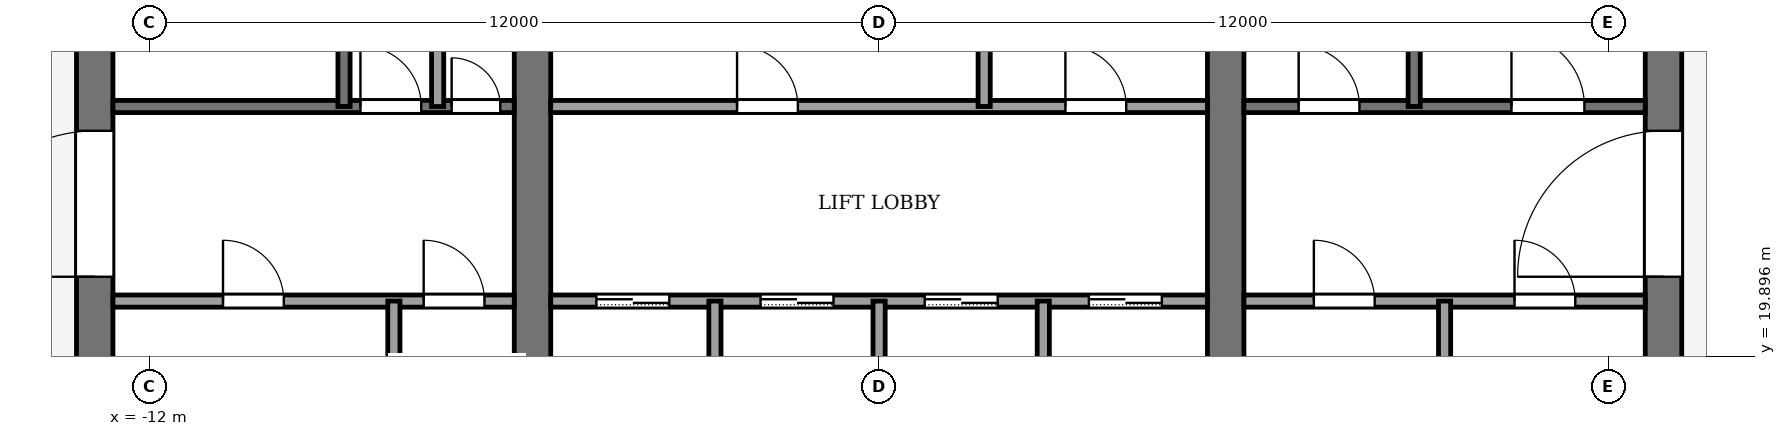
"""IFC4 building model, lengths in metres.
Left out: names, types, materials, properties, quantities, classifications, styles, units other than length and angle.
Written with IfcOpenShell. Run it as: python <this file> out.ifc"""

import sys

from ifc_helpers import new_model, si_unit, direction, frame, frame_2d, origin, place, context, subcontext, project, spatial, rectangle, extrude, element, fill, save


model = new_model("IFC4")
c1 = context("Model", 3, precision=1e-05, world=origin(), true_north=direction((0.0, 1.0)))
c2 = subcontext(c1, "Body", "Model", "MODEL_VIEW")
j1 = project(units=[si_unit("LENGTHUNIT", "METRE"), si_unit("PLANEANGLEUNIT", "RADIAN")], contexts=[c1])
p1 = place(None, origin())
s1 = spatial("IfcSite", under=j1, at=p1, CompositionType="ELEMENT")
p2 = place(p1, origin())
s2 = spatial("IfcBuilding", under=s1, at=p2, CompositionType="ELEMENT")
p3 = place(p2, frame((0.0, 0.0, 334.0)))
s3 = spatial("IfcBuildingStorey", under=s2, at=p3, CompositionType="ELEMENT", Elevation=334.0)
p4 = place(p3, frame((-12.9, 18.4, -0.18), z_axis=(0.0, 0.0, 1.0), x_axis=(0.0, 1.0, 0.0)))
e1 = element("IfcWall", 1, at=p4, inside=s3, PredefinedType="SHEAR", context=c2, shape_type="SweptSolid", body=[
    extrude(rectangle(XDim=19.2, YDim=0.6, at=frame_2d((9.6, 0.0))), origin(), (0.0, 0.0, 1.0), 6.53),
])
p5 = place(p4, frame((2.8, 0.0, 0.18)))
e2 = element("IfcOpeningElement", 2, at=p5, cuts=e1, PredefinedType="OPENING", context=c2, shape_type="SweptSolid", body=[
    extrude(rectangle(XDim=2.4, YDim=2.4, at=frame_2d((1.2, 1.2))), frame((0.0, 0.31, 0.0), z_axis=(0.0, -1.0, 0.0), x_axis=(1.0, 0.0, 0.0)), (0.0, 0.0, 1.0), 0.62),
])
p6 = place(p4, frame((13.4, 0.0, 0.18)))
e3 = element("IfcOpeningElement", 3, at=p6, cuts=e1, PredefinedType="OPENING", context=c2, shape_type="SweptSolid", body=[
    extrude(rectangle(XDim=1.4, YDim=2.2, at=frame_2d((0.7, 1.1))), frame((0.0, 0.31, 0.0), z_axis=(0.0, -1.0, 0.0), x_axis=(1.0, 0.0, 0.0)), (0.0, 0.0, 1.0), 0.62),
])
p7 = place(p3, frame((12.9, 18.4, -0.18), z_axis=(0.0, 0.0, 1.0), x_axis=(0.0, 1.0, 0.0)))
e4 = element("IfcWall", 4, at=p7, inside=s3, PredefinedType="SHEAR", context=c2, shape_type="SweptSolid", body=[
    extrude(rectangle(XDim=19.2, YDim=0.6, at=frame_2d((9.6, 0.0))), origin(), (0.0, 0.0, 1.0), 6.53),
])
p8 = place(p7, frame((2.8, 0.0, 0.18)))
e5 = element("IfcOpeningElement", 5, at=p8, cuts=e4, PredefinedType="OPENING", context=c2, shape_type="SweptSolid", body=[
    extrude(rectangle(XDim=2.4, YDim=2.4, at=frame_2d((1.2, 1.2))), frame((0.0, 0.31, 0.0), z_axis=(0.0, -1.0, 0.0), x_axis=(1.0, 0.0, 0.0)), (0.0, 0.0, 1.0), 0.62),
])
p9 = place(p7, frame((13.3, 0.0, 0.18)))
e6 = element("IfcOpeningElement", 6, at=p9, cuts=e4, PredefinedType="OPENING", context=c2, shape_type="SweptSolid", body=[
    extrude(rectangle(XDim=2.4, YDim=2.4, at=frame_2d((1.2, 1.2))), frame((0.0, 0.31, 0.0), z_axis=(0.0, -1.0, 0.0), x_axis=(1.0, 0.0, 0.0)), (0.0, 0.0, 1.0), 0.62),
])
p10 = place(p3, frame((-5.7, 18.4, -0.18), z_axis=(0.0, 0.0, 1.0), x_axis=(0.0, 1.0, 0.0)))
e7 = element("IfcWall", 7, at=p10, inside=s3, PredefinedType="SHEAR", context=c2, shape_type="SweptSolid", body=[
    extrude(rectangle(XDim=19.2, YDim=0.6, at=frame_2d((9.6, 0.0))), origin(), (0.0, 0.0, 1.0), 6.53),
])
p11 = place(p10, frame((8.35, 0.0, 0.18)))
e8 = element("IfcOpeningElement", 8, at=p11, cuts=e7, PredefinedType="OPENING", context=c2, shape_type="SweptSolid", body=[
    extrude(rectangle(XDim=0.9, YDim=2.1, at=frame_2d((0.45, 1.05))), frame((0.0, 0.31, 0.0), z_axis=(0.0, -1.0, 0.0), x_axis=(1.0, 0.0, 0.0)), (0.0, 0.0, 1.0), 0.62),
])
p12 = place(p3, frame((5.7, 18.4, -0.18), z_axis=(0.0, 0.0, 1.0), x_axis=(0.0, 1.0, 0.0)))
e9 = element("IfcWall", 9, at=p12, inside=s3, PredefinedType="SHEAR", context=c2, shape_type="SweptSolid", body=[
    extrude(rectangle(XDim=19.2, YDim=0.6, at=frame_2d((9.6, 0.0))), origin(), (0.0, 0.0, 1.0), 6.53),
])
p13 = place(p12, frame((8.35, 0.0, 0.18)))
e10 = element("IfcOpeningElement", 10, at=p13, cuts=e9, PredefinedType="OPENING", context=c2, shape_type="SweptSolid", body=[
    extrude(rectangle(XDim=0.9, YDim=2.1, at=frame_2d((0.45, 1.05))), frame((0.0, 0.31, 0.0), z_axis=(0.0, -1.0, 0.0), x_axis=(1.0, 0.0, 0.0)), (0.0, 0.0, 1.0), 0.62),
])
p14 = place(p12, frame((13.3, 0.0, 0.18)))
e11 = element("IfcOpeningElement", 11, at=p14, cuts=e9, PredefinedType="OPENING", context=c2, shape_type="SweptSolid", body=[
    extrude(rectangle(XDim=2.4, YDim=2.4, at=frame_2d((1.2, 1.2))), frame((0.0, 0.31, 0.0), z_axis=(0.0, -1.0, 0.0), x_axis=(1.0, 0.0, 0.0)), (0.0, 0.0, 1.0), 0.62),
])
p15 = place(p3, frame((-12.6, 20.8, 0.0), z_axis=(0.0, 0.0, 1.0), x_axis=(1.0, 0.0, 0.0)))
e12 = element("IfcWall", 12, at=p15, inside=s3, PredefinedType="PARTITIONING", context=c2, shape_type="SweptSolid", body=[
    extrude(rectangle(XDim=6.6, YDim=0.2, at=frame_2d((3.3, 0.0))), origin(), (0.0, 0.0, 1.0), 6.35),
])
p16 = place(p15, frame((1.81, 0.0, 0.0)))
e13 = element("IfcOpeningElement", 13, at=p16, cuts=e12, PredefinedType="OPENING", context=c2, shape_type="SweptSolid", body=[
    extrude(rectangle(XDim=1.0, YDim=2.1, at=frame_2d((0.5, 1.05))), frame((0.0, 0.11, 0.0), z_axis=(0.0, -1.0, 0.0), x_axis=(1.0, 0.0, 0.0)), (0.0, 0.0, 1.0), 0.22),
])
p17 = place(p15, frame((5.11, 0.0, 0.0)))
e14 = element("IfcOpeningElement", 14, at=p17, cuts=e12, PredefinedType="OPENING", context=c2, shape_type="SweptSolid", body=[
    extrude(rectangle(XDim=1.0, YDim=2.1, at=frame_2d((0.5, 1.05))), frame((0.0, 0.11, 0.0), z_axis=(0.0, -1.0, 0.0), x_axis=(1.0, 0.0, 0.0)), (0.0, 0.0, 1.0), 0.22),
])
p18 = place(p3, frame((-5.4, 20.8, 0.0), z_axis=(0.0, 0.0, 1.0), x_axis=(1.0, 0.0, 0.0)))
e15 = element("IfcWall", 15, at=p18, inside=s3, PredefinedType="PARTITIONING", context=c2, shape_type="SweptSolid", body=[
    extrude(rectangle(XDim=10.8, YDim=0.2, at=frame_2d((5.4, 0.0))), origin(), (0.0, 0.0, 1.0), 6.35),
])
p19 = place(p18, frame((0.75, 0.0, 0.0)))
e16 = element("IfcOpeningElement", 16, at=p19, cuts=e15, PredefinedType="OPENING", context=c2, shape_type="SweptSolid", body=[
    extrude(rectangle(XDim=1.2, YDim=2.2, at=frame_2d((0.6, 1.1))), frame((0.0, 0.11, 0.0), z_axis=(0.0, -1.0, 0.0), x_axis=(1.0, 0.0, 0.0)), (0.0, 0.0, 1.0), 0.22),
])
p20 = place(p18, frame((3.45, 0.0, 0.0)))
e17 = element("IfcOpeningElement", 17, at=p20, cuts=e15, PredefinedType="OPENING", context=c2, shape_type="SweptSolid", body=[
    extrude(rectangle(XDim=1.2, YDim=2.2, at=frame_2d((0.6, 1.1))), frame((0.0, 0.11, 0.0), z_axis=(0.0, -1.0, 0.0), x_axis=(1.0, 0.0, 0.0)), (0.0, 0.0, 1.0), 0.22),
])
p21 = place(p18, frame((6.15, 0.0, 0.0)))
e18 = element("IfcOpeningElement", 18, at=p21, cuts=e15, PredefinedType="OPENING", context=c2, shape_type="SweptSolid", body=[
    extrude(rectangle(XDim=1.2, YDim=2.2, at=frame_2d((0.6, 1.1))), frame((0.0, 0.11, 0.0), z_axis=(0.0, -1.0, 0.0), x_axis=(1.0, 0.0, 0.0)), (0.0, 0.0, 1.0), 0.22),
])
p22 = place(p18, frame((8.85, 0.0, 0.0)))
e19 = element("IfcOpeningElement", 19, at=p22, cuts=e15, PredefinedType="OPENING", context=c2, shape_type="SweptSolid", body=[
    extrude(rectangle(XDim=1.2, YDim=2.2, at=frame_2d((0.6, 1.1))), frame((0.0, 0.11, 0.0), z_axis=(0.0, -1.0, 0.0), x_axis=(1.0, 0.0, 0.0)), (0.0, 0.0, 1.0), 0.22),
])
p23 = place(p3, frame((6.0, 20.8, 0.0), z_axis=(0.0, 0.0, 1.0), x_axis=(1.0, 0.0, 0.0)))
e20 = element("IfcWall", 20, at=p23, inside=s3, PredefinedType="PARTITIONING", context=c2, shape_type="SweptSolid", body=[
    extrude(rectangle(XDim=6.6, YDim=0.2, at=frame_2d((3.3, 0.0))), origin(), (0.0, 0.0, 1.0), 6.35),
])
p24 = place(p23, frame((1.15, 0.0, 0.0)))
e21 = element("IfcOpeningElement", 21, at=p24, cuts=e20, PredefinedType="OPENING", context=c2, shape_type="SweptSolid", body=[
    extrude(rectangle(XDim=1.0, YDim=2.1, at=frame_2d((0.5, 1.05))), frame((0.0, 0.11, 0.0), z_axis=(0.0, -1.0, 0.0), x_axis=(1.0, 0.0, 0.0)), (0.0, 0.0, 1.0), 0.22),
])
p25 = place(p23, frame((4.45, 0.0, 0.0)))
e22 = element("IfcOpeningElement", 22, at=p25, cuts=e20, PredefinedType="OPENING", context=c2, shape_type="SweptSolid", body=[
    extrude(rectangle(XDim=1.0, YDim=2.1, at=frame_2d((0.5, 1.05))), frame((0.0, 0.11, 0.0), z_axis=(0.0, -1.0, 0.0), x_axis=(1.0, 0.0, 0.0)), (0.0, 0.0, 1.0), 0.22),
])
p26 = place(p3, frame((-12.6, 24.0, 0.0), z_axis=(0.0, 0.0, 1.0), x_axis=(1.0, 0.0, 0.0)))
e23 = element("IfcWall", 23, at=p26, inside=s3, PredefinedType="PARTITIONING", context=c2, shape_type="SweptSolid", body=[
    extrude(rectangle(XDim=6.6, YDim=0.2, at=frame_2d((3.3, 0.0))), origin(), (0.0, 0.0, 1.0), 6.35),
])
p27 = place(p26, frame((4.07, 0.0, 0.0)))
e24 = element("IfcOpeningElement", 24, at=p27, cuts=e23, PredefinedType="OPENING", context=c2, shape_type="SweptSolid", body=[
    extrude(rectangle(XDim=1.0, YDim=2.1, at=frame_2d((0.5, 1.05))), frame((0.0, 0.11, 0.0), z_axis=(0.0, -1.0, 0.0), x_axis=(1.0, 0.0, 0.0)), (0.0, 0.0, 1.0), 0.22),
])
p28 = place(p26, frame((5.57, 0.0, 0.0)))
e25 = element("IfcOpeningElement", 25, at=p28, cuts=e23, PredefinedType="OPENING", context=c2, shape_type="SweptSolid", body=[
    extrude(rectangle(XDim=0.8, YDim=2.1, at=frame_2d((0.4, 1.05))), frame((0.0, 0.11, 0.0), z_axis=(0.0, -1.0, 0.0), x_axis=(1.0, 0.0, 0.0)), (0.0, 0.0, 1.0), 0.22),
])
p29 = place(p3, frame((-5.4, 24.0, 0.0), z_axis=(0.0, 0.0, 1.0), x_axis=(1.0, 0.0, 0.0)))
e26 = element("IfcWall", 26, at=p29, inside=s3, PredefinedType="PARTITIONING", context=c2, shape_type="SweptSolid", body=[
    extrude(rectangle(XDim=10.8, YDim=0.2, at=frame_2d((5.4, 0.0))), origin(), (0.0, 0.0, 1.0), 6.35),
])
p30 = place(p29, frame((3.064, 0.0, 0.0)))
e27 = element("IfcOpeningElement", 27, at=p30, cuts=e26, PredefinedType="OPENING", context=c2, shape_type="SweptSolid", body=[
    extrude(rectangle(XDim=1.0, YDim=2.1, at=frame_2d((0.5, 1.05))), frame((0.0, 0.11, 0.0), z_axis=(0.0, -1.0, 0.0), x_axis=(1.0, 0.0, 0.0)), (0.0, 0.0, 1.0), 0.22),
])
p31 = place(p29, frame((8.464, 0.0, 0.0)))
e28 = element("IfcOpeningElement", 28, at=p31, cuts=e26, PredefinedType="OPENING", context=c2, shape_type="SweptSolid", body=[
    extrude(rectangle(XDim=1.0, YDim=2.1, at=frame_2d((0.5, 1.05))), frame((0.0, 0.11, 0.0), z_axis=(0.0, -1.0, 0.0), x_axis=(1.0, 0.0, 0.0)), (0.0, 0.0, 1.0), 0.22),
])
p32 = place(p3, frame((6.0, 24.0, 0.0), z_axis=(0.0, 0.0, 1.0), x_axis=(1.0, 0.0, 0.0)))
e29 = element("IfcWall", 29, at=p32, inside=s3, PredefinedType="PARTITIONING", context=c2, shape_type="SweptSolid", body=[
    extrude(rectangle(XDim=6.6, YDim=0.2, at=frame_2d((3.3, 0.0))), origin(), (0.0, 0.0, 1.0), 6.35),
])
p33 = place(p32, frame((0.9, 0.0, 0.0)))
e30 = element("IfcOpeningElement", 30, at=p33, cuts=e29, PredefinedType="OPENING", context=c2, shape_type="SweptSolid", body=[
    extrude(rectangle(XDim=1.0, YDim=2.1, at=frame_2d((0.5, 1.05))), frame((0.0, 0.11, 0.0), z_axis=(0.0, -1.0, 0.0), x_axis=(1.0, 0.0, 0.0)), (0.0, 0.0, 1.0), 0.22),
])
p34 = place(p32, frame((4.4, 0.0, 0.0)))
e31 = element("IfcOpeningElement", 31, at=p34, cuts=e29, PredefinedType="OPENING", context=c2, shape_type="SweptSolid", body=[
    extrude(rectangle(XDim=1.2, YDim=2.2, at=frame_2d((0.6, 1.1))), frame((0.0, 0.11, 0.0), z_axis=(0.0, -1.0, 0.0), x_axis=(1.0, 0.0, 0.0)), (0.0, 0.0, 1.0), 0.22),
])
p35 = place(p3, frame((-8.8, 24.0, 0.0), z_axis=(0.0, 0.0, 1.0), x_axis=(0.0, 1.0, 0.0)))
e32 = element("IfcWall", 32, at=p35, inside=s3, PredefinedType="PARTITIONING", context=c2, shape_type="SweptSolid", body=[
    extrude(rectangle(XDim=7.4, YDim=0.2, at=frame_2d((3.7, 0.0))), origin(), (0.0, 0.0, 1.0), 6.35),
])
p36 = place(p3, frame((-7.98, 18.4, 0.0), z_axis=(0.0, 0.0, 1.0), x_axis=(0.0, 1.0, 0.0)))
e33 = element("IfcWall", 33, at=p36, inside=s3, PredefinedType="PARTITIONING", context=c2, shape_type="SweptSolid", body=[
    extrude(rectangle(XDim=2.4, YDim=0.2, at=frame_2d((1.2, 0.0))), origin(), (0.0, 0.0, 1.0), 6.35),
])
p37 = place(p3, frame((-7.26, 24.0, 0.0), z_axis=(0.0, 0.0, 1.0), x_axis=(0.0, 1.0, 0.0)))
e34 = element("IfcWall", 34, at=p37, inside=s3, PredefinedType="PARTITIONING", context=c2, shape_type="SweptSolid", body=[
    extrude(rectangle(XDim=7.4, YDim=0.2, at=frame_2d((3.7, 0.0))), origin(), (0.0, 0.0, 1.0), 6.35),
])
for number, where, z_axis, x_axis in (
    (35, (-2.7, 18.4, 0.0), (0.0, 0.0, 1.0), (0.0, 1.0, 0.0)),
    (36, (0.0, 18.4, 0.0), (0.0, 0.0, 1.0), (0.0, 1.0, 0.0)),
):
    element("IfcWall", number, at=place(p3, frame(where, z_axis=z_axis, x_axis=x_axis)), inside=s3, PredefinedType="PARTITIONING", context=c2, shape_type="SweptSolid", body=[
        extrude(rectangle(XDim=2.4, YDim=0.2, at=frame_2d((1.2, 0.0))), origin(), (0.0, 0.0, 1.0), 6.35),
    ])
p38 = place(p3, frame((1.728, 24.0, 0.0), z_axis=(0.0, 0.0, 1.0), x_axis=(0.0, 1.0, 0.0)))
e37 = element("IfcWall", 37, at=p38, inside=s3, PredefinedType="PARTITIONING", context=c2, shape_type="SweptSolid", body=[
    extrude(rectangle(XDim=2.4, YDim=0.2, at=frame_2d((1.2, 0.0))), origin(), (0.0, 0.0, 1.0), 6.35),
])
p39 = place(p3, frame((2.7, 18.4, 0.0), z_axis=(0.0, 0.0, 1.0), x_axis=(0.0, 1.0, 0.0)))
e38 = element("IfcWall", 38, at=p39, inside=s3, PredefinedType="PARTITIONING", context=c2, shape_type="SweptSolid", body=[
    extrude(rectangle(XDim=2.4, YDim=0.2, at=frame_2d((1.2, 0.0))), origin(), (0.0, 0.0, 1.0), 6.35),
])
p40 = place(p3, frame((8.8, 24.0, 0.0), z_axis=(0.0, 0.0, 1.0), x_axis=(0.0, 1.0, 0.0)))
e39 = element("IfcWall", 39, at=p40, inside=s3, PredefinedType="PARTITIONING", context=c2, shape_type="SweptSolid", body=[
    extrude(rectangle(XDim=7.4, YDim=0.2, at=frame_2d((3.7, 0.0))), origin(), (0.0, 0.0, 1.0), 6.35),
])
p41 = place(p3, frame((9.3, 18.4, 0.0), z_axis=(0.0, 0.0, 1.0), x_axis=(0.0, 1.0, 0.0)))
e40 = element("IfcWall", 40, at=p41, inside=s3, PredefinedType="PARTITIONING", context=c2, shape_type="SweptSolid", body=[
    extrude(rectangle(XDim=2.4, YDim=0.2, at=frame_2d((1.2, 0.0))), origin(), (0.0, 0.0, 1.0), 6.35),
])
p42 = place(p19, origin())
e41 = element("IfcDoor", 41, at=p42, inside=s3, OperationType="SLIDING_TO_LEFT", PredefinedType="DOOR", context=c2, shape_type="SweptSolid", body=[
    extrude(rectangle(XDim=1.2, YDim=2.2, at=frame_2d((0.6, 1.1))), frame((0.0, 0.025, 0.0), z_axis=(0.0, -1.0, 0.0), x_axis=(1.0, 0.0, 0.0)), (0.0, 0.0, 1.0), 0.05),
])
fill(e16, e41)
p43 = place(p20, origin())
e42 = element("IfcDoor", 42, at=p43, inside=s3, OperationType="SLIDING_TO_LEFT", PredefinedType="DOOR", context=c2, shape_type="SweptSolid", body=[
    extrude(rectangle(XDim=1.2, YDim=2.2, at=frame_2d((0.6, 1.1))), frame((0.0, 0.025, 0.0), z_axis=(0.0, -1.0, 0.0), x_axis=(1.0, 0.0, 0.0)), (0.0, 0.0, 1.0), 0.05),
])
fill(e17, e42)
p44 = place(p21, origin())
e43 = element("IfcDoor", 43, at=p44, inside=s3, OperationType="SLIDING_TO_LEFT", PredefinedType="DOOR", context=c2, shape_type="SweptSolid", body=[
    extrude(rectangle(XDim=1.2, YDim=2.2, at=frame_2d((0.6, 1.1))), frame((0.0, 0.025, 0.0), z_axis=(0.0, -1.0, 0.0), x_axis=(1.0, 0.0, 0.0)), (0.0, 0.0, 1.0), 0.05),
])
fill(e18, e43)
p45 = place(p22, origin())
e44 = element("IfcDoor", 44, at=p45, inside=s3, OperationType="SLIDING_TO_LEFT", PredefinedType="DOOR", context=c2, shape_type="SweptSolid", body=[
    extrude(rectangle(XDim=1.2, YDim=2.2, at=frame_2d((0.6, 1.1))), frame((0.0, 0.025, 0.0), z_axis=(0.0, -1.0, 0.0), x_axis=(1.0, 0.0, 0.0)), (0.0, 0.0, 1.0), 0.05),
])
fill(e19, e44)
p46 = place(p30, origin())
e45 = element("IfcDoor", 45, at=p46, inside=s3, OperationType="SINGLE_SWING_RIGHT", PredefinedType="DOOR", context=c2, shape_type="SweptSolid", body=[
    extrude(rectangle(XDim=1.0, YDim=2.1, at=frame_2d((0.5, 1.05))), frame((0.0, 0.025, 0.0), z_axis=(0.0, -1.0, 0.0), x_axis=(1.0, 0.0, 0.0)), (0.0, 0.0, 1.0), 0.05),
])
fill(e27, e45)
p47 = place(p31, origin())
e46 = element("IfcDoor", 46, at=p47, inside=s3, OperationType="SINGLE_SWING_LEFT", PredefinedType="DOOR", context=c2, shape_type="SweptSolid", body=[
    extrude(rectangle(XDim=1.0, YDim=2.1, at=frame_2d((0.5, 1.05))), frame((0.0, 0.025, 0.0), z_axis=(0.0, -1.0, 0.0), x_axis=(1.0, 0.0, 0.0)), (0.0, 0.0, 1.0), 0.05),
])
fill(e28, e46)
p48 = place(p16, origin())
e47 = element("IfcDoor", 47, at=p48, inside=s3, OperationType="SINGLE_SWING_LEFT", PredefinedType="DOOR", context=c2, shape_type="SweptSolid", body=[
    extrude(rectangle(XDim=1.0, YDim=2.1, at=frame_2d((0.5, 1.05))), frame((0.0, 0.025, 0.0), z_axis=(0.0, -1.0, 0.0), x_axis=(1.0, 0.0, 0.0)), (0.0, 0.0, 1.0), 0.05),
])
fill(e13, e47)
p49 = place(p17, origin())
e48 = element("IfcDoor", 48, at=p49, inside=s3, OperationType="SINGLE_SWING_LEFT", PredefinedType="DOOR", context=c2, shape_type="SweptSolid", body=[
    extrude(rectangle(XDim=1.0, YDim=2.1, at=frame_2d((0.5, 1.05))), frame((0.0, 0.025, 0.0), z_axis=(0.0, -1.0, 0.0), x_axis=(1.0, 0.0, 0.0)), (0.0, 0.0, 1.0), 0.05),
])
fill(e14, e48)
p50 = place(p24, origin())
e49 = element("IfcDoor", 49, at=p50, inside=s3, OperationType="SINGLE_SWING_LEFT", PredefinedType="DOOR", context=c2, shape_type="SweptSolid", body=[
    extrude(rectangle(XDim=1.0, YDim=2.1, at=frame_2d((0.5, 1.05))), frame((0.0, 0.025, 0.0), z_axis=(0.0, -1.0, 0.0), x_axis=(1.0, 0.0, 0.0)), (0.0, 0.0, 1.0), 0.05),
])
fill(e21, e49)
p51 = place(p25, origin())
e50 = element("IfcDoor", 50, at=p51, inside=s3, OperationType="SINGLE_SWING_LEFT", PredefinedType="DOOR", context=c2, shape_type="SweptSolid", body=[
    extrude(rectangle(XDim=1.0, YDim=2.1, at=frame_2d((0.5, 1.05))), frame((0.0, 0.025, 0.0), z_axis=(0.0, -1.0, 0.0), x_axis=(1.0, 0.0, 0.0)), (0.0, 0.0, 1.0), 0.05),
])
fill(e22, e50)
p52 = place(p27, origin())
e51 = element("IfcDoor", 51, at=p52, inside=s3, OperationType="SINGLE_SWING_RIGHT", PredefinedType="DOOR", context=c2, shape_type="SweptSolid", body=[
    extrude(rectangle(XDim=1.0, YDim=2.1, at=frame_2d((0.5, 1.05))), frame((0.0, 0.025, 0.0), z_axis=(0.0, -1.0, 0.0), x_axis=(1.0, 0.0, 0.0)), (0.0, 0.0, 1.0), 0.05),
])
fill(e24, e51)
p53 = place(p28, origin())
e52 = element("IfcDoor", 52, at=p53, inside=s3, OperationType="SINGLE_SWING_LEFT", PredefinedType="DOOR", context=c2, shape_type="SweptSolid", body=[
    extrude(rectangle(XDim=0.8, YDim=2.1, at=frame_2d((0.4, 1.05))), frame((0.0, 0.025, 0.0), z_axis=(0.0, -1.0, 0.0), x_axis=(1.0, 0.0, 0.0)), (0.0, 0.0, 1.0), 0.05),
])
fill(e25, e52)
p54 = place(p33, origin())
e53 = element("IfcDoor", 53, at=p54, inside=s3, OperationType="SINGLE_SWING_RIGHT", PredefinedType="DOOR", context=c2, shape_type="SweptSolid", body=[
    extrude(rectangle(XDim=1.0, YDim=2.1, at=frame_2d((0.5, 1.05))), frame((0.0, 0.025, 0.0), z_axis=(0.0, -1.0, 0.0), x_axis=(1.0, 0.0, 0.0)), (0.0, 0.0, 1.0), 0.05),
])
fill(e30, e53)
p55 = place(p34, origin())
e54 = element("IfcDoor", 54, at=p55, inside=s3, OperationType="SINGLE_SWING_LEFT", PredefinedType="DOOR", context=c2, shape_type="SweptSolid", body=[
    extrude(rectangle(XDim=1.2, YDim=2.2, at=frame_2d((0.6, 1.1))), frame((0.0, 0.025, 0.0), z_axis=(0.0, -1.0, 0.0), x_axis=(1.0, 0.0, 0.0)), (0.0, 0.0, 1.0), 0.05),
])
fill(e31, e54)
p56 = place(p5, origin())
e55 = element("IfcDoor", 55, at=p56, inside=s3, OperationType="DOUBLE_DOOR_SINGLE_SWING", PredefinedType="DOOR", context=c2, shape_type="SweptSolid", body=[
    extrude(rectangle(XDim=2.4, YDim=2.4, at=frame_2d((1.2, 1.2))), frame((0.0, 0.025, 0.0), z_axis=(0.0, -1.0, 0.0), x_axis=(1.0, 0.0, 0.0)), (0.0, 0.0, 1.0), 0.05),
])
fill(e2, e55)
p57 = place(p8, origin())
e56 = element("IfcDoor", 56, at=p57, inside=s3, OperationType="DOUBLE_DOOR_SINGLE_SWING", PredefinedType="DOOR", context=c2, shape_type="SweptSolid", body=[
    extrude(rectangle(XDim=2.4, YDim=2.4, at=frame_2d((1.2, 1.2))), frame((0.0, 0.025, 0.0), z_axis=(0.0, -1.0, 0.0), x_axis=(1.0, 0.0, 0.0)), (0.0, 0.0, 1.0), 0.05),
])
fill(e5, e56)
save(model, sys.argv[1])
